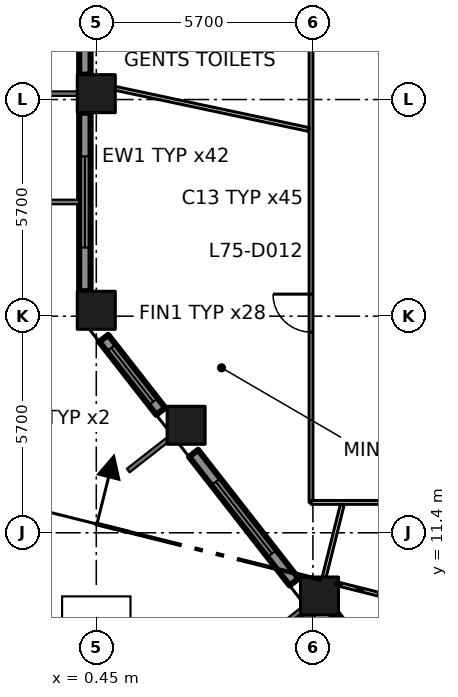
"""IFC4 building model, lengths in metres.
Left out: names, types, materials, properties, quantities, classifications, styles, units other than length and angle.
Written with IfcOpenShell. Run it as: python <this file> out.ifc"""

import sys

from ifc_helpers import new_model, si_unit, direction, frame, frame_2d, origin, origin_2d, place, context, subcontext, project, spatial, rectangle, extrude, element, fill, save


model = new_model("IFC4")
c1 = context("Model", 3, precision=1e-05, world=origin(), true_north=direction((0.0, 1.0)))
c2 = subcontext(c1, "Body", "Model", "MODEL_VIEW")
j1 = project(units=[si_unit("LENGTHUNIT", "METRE"), si_unit("PLANEANGLEUNIT", "RADIAN")], contexts=[c1])
p1 = place(None, origin())
s1 = spatial("IfcSite", under=j1, at=p1, CompositionType="ELEMENT")
p2 = place(p1, origin())
s2 = spatial("IfcBuilding", under=s1, at=p2, CompositionType="ELEMENT")
p3 = place(p2, frame((0.0, 0.0, 327.6)))
s3 = spatial("IfcBuildingStorey", under=s2, at=p3, CompositionType="ELEMENT", Elevation=327.6)
for number, where, z_axis, x_axis in (
    (1, (0.45, 17.255, 0.0), (0.0, 0.0, 1.0), (1.0, 0.0, 0.0)),
    (2, (0.45, 22.955, 0.0), (0.0, 0.0, 1.0), (1.0, 0.0, 0.0)),
    (3, (6.323, 9.737, 0.0), (0.0, 0.0, 1.0), (1.0, 0.0, 0.0)),
    (4, (2.814, 14.229, 0.0), (0.0, 0.0, 1.0), (1.0, 0.0, 0.0)),
):
    element("IfcColumn", number, at=place(p3, frame(where, z_axis=z_axis, x_axis=x_axis)), inside=s3, PredefinedType="COLUMN", context=c2, shape_type="SweptSolid", body=[
        extrude(rectangle(XDim=1.0, YDim=1.0, at=origin_2d()), origin(), (0.0, 0.0, 1.0), 4.2),
    ])
p4 = place(p3, frame((0.15, 28.155, 0.0), z_axis=(0.0, 0.0, 1.0), x_axis=(0.0, -1.0, 0.0)))
e5 = element("IfcWall", 5, at=p4, inside=s3, PredefinedType="SOLIDWALL", context=c2, shape_type="SweptSolid", body=[
    extrude(rectangle(XDim=4.7, YDim=0.3, at=frame_2d((2.35, 0.0))), origin(), (0.0, 0.0, 1.0), 3.2),
])
p5 = place(p4, frame((1.15, 0.0, 0.8)))
e6 = element("IfcOpeningElement", 6, at=p5, cuts=e5, PredefinedType="OPENING", context=c2, shape_type="SweptSolid", body=[
    extrude(rectangle(XDim=2.4, YDim=2.1, at=frame_2d((1.2, 1.05))), frame((0.0, 0.16, 0.0), z_axis=(0.0, -1.0, 0.0), x_axis=(1.0, 0.0, 0.0)), (0.0, 0.0, 1.0), 0.32),
])
p6 = place(p3, frame((0.15, 22.455, 0.0), z_axis=(0.0, 0.0, 1.0), x_axis=(0.0, -1.0, 0.0)))
e7 = element("IfcWall", 7, at=p6, inside=s3, PredefinedType="SOLIDWALL", context=c2, shape_type="SweptSolid", body=[
    extrude(rectangle(XDim=4.7, YDim=0.3, at=frame_2d((2.35, 0.0))), origin(), (0.0, 0.0, 1.0), 3.2),
])
p7 = place(p6, frame((1.15, 0.0, 0.8)))
e8 = element("IfcOpeningElement", 8, at=p7, cuts=e7, PredefinedType="OPENING", context=c2, shape_type="SweptSolid", body=[
    extrude(rectangle(XDim=2.4, YDim=2.1, at=frame_2d((1.2, 1.05))), frame((0.0, 0.16, 0.0), z_axis=(0.0, -1.0, 0.0), x_axis=(1.0, 0.0, 0.0)), (0.0, 0.0, 1.0), 0.32),
])
p8 = place(p3, frame((0.646, 16.517, 0.0), z_axis=(0.0, 0.0, 1.0), x_axis=(0.615610986717, -0.788050197026, 0.0)))
e9 = element("IfcWall", 9, at=p8, inside=s3, PredefinedType="SOLIDWALL", context=c2, shape_type="SweptSolid", body=[
    extrude(rectangle(XDim=2.437, YDim=0.3, at=frame_2d((1.218, 0.0))), origin(), (0.0, 0.0, 1.0), 3.2),
])
p9 = place(p8, frame((0.318, 0.0, 0.8)))
e10 = element("IfcOpeningElement", 10, at=p9, cuts=e9, PredefinedType="OPENING", context=c2, shape_type="SweptSolid", body=[
    extrude(rectangle(XDim=1.8, YDim=2.1, at=frame_2d((0.9, 1.05))), frame((0.0, 0.16, 0.0), z_axis=(0.0, -1.0, 0.0), x_axis=(1.0, 0.0, 0.0)), (0.0, 0.0, 1.0), 0.32),
])
p10 = place(p3, frame((3.01, 13.491, 0.0), z_axis=(0.0, 0.0, 1.0), x_axis=(0.615713519567, -0.787970089421, 0.0)))
e11 = element("IfcWall", 11, at=p10, inside=s3, PredefinedType="SOLIDWALL", context=c2, shape_type="SweptSolid", body=[
    extrude(rectangle(XDim=4.296, YDim=0.3, at=frame_2d((2.148, 0.0))), origin(), (0.0, 0.0, 1.0), 3.2),
])
p11 = place(p10, frame((0.948, 0.0, 0.8)))
e12 = element("IfcOpeningElement", 12, at=p11, cuts=e11, PredefinedType="OPENING", context=c2, shape_type="SweptSolid", body=[
    extrude(rectangle(XDim=2.4, YDim=2.1, at=frame_2d((1.2, 1.05))), frame((0.0, 0.16, 0.0), z_axis=(0.0, -1.0, 0.0), x_axis=(1.0, 0.0, 0.0)), (0.0, 0.0, 1.0), 0.32),
])
p12 = place(p3, frame((6.715, 9.237, 0.0), z_axis=(0.0, 0.0, 1.0), x_axis=(0.615465445194, -0.788163869873, 0.0)))
e13 = element("IfcWall", 13, at=p12, inside=s3, PredefinedType="SOLIDWALL", context=c2, shape_type="SweptSolid", body=[
    extrude(rectangle(XDim=4.43, YDim=0.2, at=frame_2d((2.215, 0.0))), origin(), (0.0, 0.0, 1.0), 3.2),
])
p13 = place(p12, frame((1.315, 0.0, 0.0)))
e14 = element("IfcOpeningElement", 14, at=p13, cuts=e13, PredefinedType="OPENING", context=c2, shape_type="SweptSolid", body=[
    extrude(rectangle(XDim=1.8, YDim=2.9, at=frame_2d((0.9, 1.45))), frame((0.0, 0.11, 0.0), z_axis=(0.0, -1.0, 0.0), x_axis=(1.0, 0.0, 0.0)), (0.0, 0.0, 1.0), 0.22),
])
p14 = place(p3, frame((6.1, 12.2, 0.0), z_axis=(0.0, 0.0, 1.0), x_axis=(0.0, 1.0, 0.0)))
e15 = element("IfcWall", 15, at=p14, inside=s3, PredefinedType="PARTITIONING", context=c2, shape_type="SweptSolid", body=[
    extrude(rectangle(XDim=26.7, YDim=0.1, at=frame_2d((13.35, 0.0))), origin(), (0.0, 0.0, 1.0), 3.9),
])
p15 = place(p14, frame((4.48, 0.0, 0.0)))
e16 = element("IfcOpeningElement", 16, at=p15, cuts=e15, PredefinedType="OPENING", context=c2, shape_type="SweptSolid", body=[
    extrude(rectangle(XDim=1.0, YDim=2.1, at=frame_2d((0.5, 1.05))), frame((0.0, 0.06, 0.0), z_axis=(0.0, -1.0, 0.0), x_axis=(1.0, 0.0, 0.0)), (0.0, 0.0, 1.0), 0.12),
])
p16 = place(p14, frame((12.279, 0.0, 0.0)))
e17 = element("IfcOpeningElement", 17, at=p16, cuts=e15, PredefinedType="OPENING", context=c2, shape_type="SweptSolid", body=[
    extrude(rectangle(XDim=1.0, YDim=2.1, at=frame_2d((0.5, 1.05))), frame((0.0, 0.06, 0.0), z_axis=(0.0, -1.0, 0.0), x_axis=(1.0, 0.0, 0.0)), (0.0, 0.0, 1.0), 0.12),
])
p17 = place(p14, frame((20.979, 0.0, 0.0)))
e18 = element("IfcOpeningElement", 18, at=p17, cuts=e15, PredefinedType="OPENING", context=c2, shape_type="SweptSolid", body=[
    extrude(rectangle(XDim=1.0, YDim=2.1, at=frame_2d((0.5, 1.05))), frame((0.0, 0.06, 0.0), z_axis=(0.0, -1.0, 0.0), x_axis=(1.0, 0.0, 0.0)), (0.0, 0.0, 1.0), 0.12),
])
p18 = place(p3, frame((6.1, 12.2, 0.0), z_axis=(0.0, 0.0, 1.0), x_axis=(1.0, 0.0, 0.0)))
e19 = element("IfcWall", 19, at=p18, inside=s3, PredefinedType="PARTITIONING", context=c2, shape_type="SweptSolid", body=[
    extrude(rectangle(XDim=3.8, YDim=0.1, at=frame_2d((1.9, 0.0))), origin(), (0.0, 0.0, 1.0), 3.9),
])
p19 = place(p3, frame((6.04, 22.012, 0.0), z_axis=(0.0, 0.0, 1.0), x_axis=(-0.978143705428, 0.207930015946, 0.0)))
e20 = element("IfcWall", 20, at=p19, inside=s3, PredefinedType="PARTITIONING", context=c2, shape_type="SweptSolid", body=[
    extrude(rectangle(XDim=5.204, YDim=0.1, at=frame_2d((2.602, 0.0))), origin(), (0.0, 0.0, 1.0), 3.9),
])
p20 = place(p3, frame((6.922, 12.138, 0.0), z_axis=(0.0, 0.0, 1.0), x_axis=(-0.242476987996, -0.970157157523, 0.0)))
e21 = element("IfcWall", 21, at=p20, inside=s3, PredefinedType="PARTITIONING", context=c2, shape_type="SweptSolid", body=[
    extrude(rectangle(XDim=1.959, YDim=0.1, at=frame_2d((0.98, 0.0))), origin(), (0.0, 0.0, 1.0), 3.9),
])
p21 = place(p3, frame((8.72, 9.575, 0.0), z_axis=(0.0, 0.0, 1.0), x_axis=(-0.970274576003, 0.242006708918, 0.0)))
e22 = element("IfcWall", 22, at=p21, inside=s3, PredefinedType="PARTITIONING", context=c2, shape_type="SweptSolid", body=[
    extrude(rectangle(XDim=1.955, YDim=0.1, at=frame_2d((0.978, 0.0))), origin(), (0.0, 0.0, 1.0), 3.9),
])
p22 = place(p7, origin())
e23 = element("IfcWindow", 23, at=p22, inside=s3, PartitioningType="DOUBLE_PANEL_VERTICAL", PredefinedType="WINDOW", context=c2, shape_type="SweptSolid", body=[
    extrude(rectangle(XDim=2.4, YDim=2.1, at=frame_2d((1.2, 1.05))), frame((0.0, 0.03, 0.0), z_axis=(0.0, -1.0, 0.0), x_axis=(1.0, 0.0, 0.0)), (0.0, 0.0, 1.0), 0.06),
])
fill(e8, e23)
p23 = place(p9, origin())
e24 = element("IfcWindow", 24, at=p23, inside=s3, PartitioningType="DOUBLE_PANEL_VERTICAL", PredefinedType="WINDOW", context=c2, shape_type="SweptSolid", body=[
    extrude(rectangle(XDim=1.8, YDim=2.1, at=frame_2d((0.9, 1.05))), frame((0.0, 0.03, 0.0), z_axis=(0.0, -1.0, 0.0), x_axis=(1.0, 0.0, 0.0)), (0.0, 0.0, 1.0), 0.06),
])
fill(e10, e24)
p24 = place(p11, origin())
e25 = element("IfcWindow", 25, at=p24, inside=s3, PartitioningType="DOUBLE_PANEL_VERTICAL", PredefinedType="WINDOW", context=c2, shape_type="SweptSolid", body=[
    extrude(rectangle(XDim=2.4, YDim=2.1, at=frame_2d((1.2, 1.05))), frame((0.0, 0.03, 0.0), z_axis=(0.0, -1.0, 0.0), x_axis=(1.0, 0.0, 0.0)), (0.0, 0.0, 1.0), 0.06),
])
fill(e12, e25)
p25 = place(p15, origin())
e26 = element("IfcDoor", 26, at=p25, inside=s3, OperationType="SINGLE_SWING_RIGHT", PredefinedType="DOOR", context=c2, shape_type="SweptSolid", body=[
    extrude(rectangle(XDim=1.0, YDim=2.1, at=frame_2d((0.5, 1.05))), frame((0.0, 0.025, 0.0), z_axis=(0.0, -1.0, 0.0), x_axis=(1.0, 0.0, 0.0)), (0.0, 0.0, 1.0), 0.05),
])
fill(e16, e26)
save(model, sys.argv[1])
